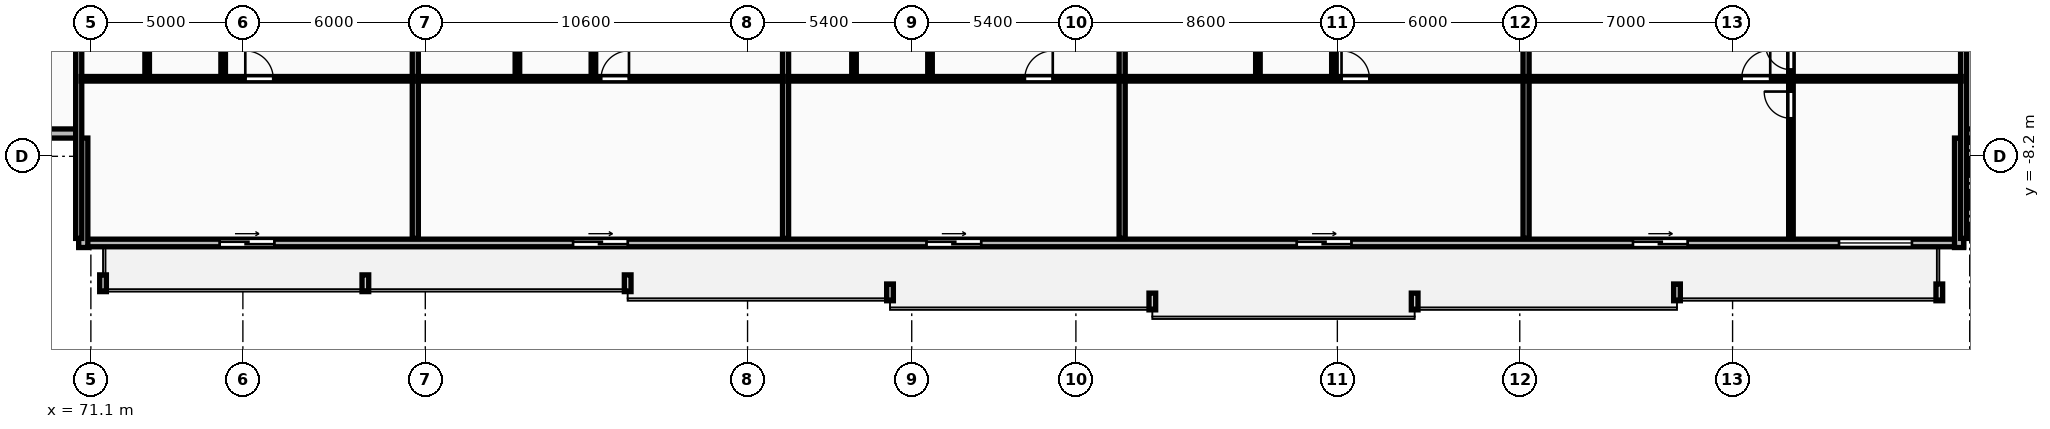
"""IFC4 building model, lengths in metres.
Left out: names, types, materials, properties, quantities, classifications, styles, units other than length and angle.
Written with IfcOpenShell. Run it as: python <this file> out.ifc"""

import sys

from ifc_helpers import new_model, si_unit, direction, frame, frame_2d, origin, place, context, subcontext, project, spatial, rectangle, extrude, element, fill, save


model = new_model("IFC4")
c1 = context("Model", 3, precision=1e-05, world=origin(), true_north=direction((0.0, 1.0)))
c2 = subcontext(c1, "Body", "Model", "MODEL_VIEW")
j1 = project(units=[si_unit("LENGTHUNIT", "METRE"), si_unit("PLANEANGLEUNIT", "RADIAN")], contexts=[c1])
p1 = place(None, origin())
s1 = spatial("IfcSite", under=j1, at=p1, CompositionType="ELEMENT")
p2 = place(p1, origin())
s2 = spatial("IfcBuilding", under=s1, at=p2, CompositionType="ELEMENT")
p3 = place(p2, frame((0.0, 0.0, 24.0)))
s3 = spatial("IfcBuildingStorey", under=s2, at=p3, CompositionType="ELEMENT", Elevation=24.0)
p4 = place(p3, frame((70.7, -11.05, 0.0), z_axis=(0.0, 0.0, 1.0), x_axis=(1.0, 0.0, 0.0)))
e1 = element("IfcWall", 1, at=p4, inside=s3, PredefinedType="STANDARD", context=c2, shape_type="SweptSolid", body=[
    extrude(rectangle(XDim=62.0, YDim=0.25, at=frame_2d((31.0, 0.0))), origin(), (0.0, 0.0, 1.0), 2.97),
])
p5 = place(p4, frame((4.636, 0.0, 0.0)))
e2 = element("IfcOpeningElement", 2, at=p5, cuts=e1, PredefinedType="OPENING", context=c2, shape_type="SweptSolid", body=[
    extrude(rectangle(XDim=1.8, YDim=2.2, at=frame_2d((0.9, 1.1))), frame((0.0, 0.135, 0.0), z_axis=(0.0, -1.0, 0.0), x_axis=(1.0, 0.0, 0.0)), (0.0, 0.0, 1.0), 0.27),
])
p6 = place(p4, frame((16.261, 0.0, 0.0)))
e3 = element("IfcOpeningElement", 3, at=p6, cuts=e1, PredefinedType="OPENING", context=c2, shape_type="SweptSolid", body=[
    extrude(rectangle(XDim=1.8, YDim=2.2, at=frame_2d((0.9, 1.1))), frame((0.0, 0.135, 0.0), z_axis=(0.0, -1.0, 0.0), x_axis=(1.0, 0.0, 0.0)), (0.0, 0.0, 1.0), 0.27),
])
p7 = place(p4, frame((27.886, 0.0, 0.0)))
e4 = element("IfcOpeningElement", 4, at=p7, cuts=e1, PredefinedType="OPENING", context=c2, shape_type="SweptSolid", body=[
    extrude(rectangle(XDim=1.8, YDim=2.2, at=frame_2d((0.9, 1.1))), frame((0.0, 0.135, 0.0), z_axis=(0.0, -1.0, 0.0), x_axis=(1.0, 0.0, 0.0)), (0.0, 0.0, 1.0), 0.27),
])
p8 = place(p4, frame((40.064, 0.0, 0.0)))
e5 = element("IfcOpeningElement", 5, at=p8, cuts=e1, PredefinedType="OPENING", context=c2, shape_type="SweptSolid", body=[
    extrude(rectangle(XDim=1.8, YDim=2.2, at=frame_2d((0.9, 1.1))), frame((0.0, 0.135, 0.0), z_axis=(0.0, -1.0, 0.0), x_axis=(1.0, 0.0, 0.0)), (0.0, 0.0, 1.0), 0.27),
])
p9 = place(p4, frame((51.124, 0.0, 0.0)))
e6 = element("IfcOpeningElement", 6, at=p9, cuts=e1, PredefinedType="OPENING", context=c2, shape_type="SweptSolid", body=[
    extrude(rectangle(XDim=1.8, YDim=2.2, at=frame_2d((0.9, 1.1))), frame((0.0, 0.135, 0.0), z_axis=(0.0, -1.0, 0.0), x_axis=(1.0, 0.0, 0.0)), (0.0, 0.0, 1.0), 0.27),
])
p10 = place(p4, frame((57.9, 0.0, 0.85)))
e7 = element("IfcOpeningElement", 7, at=p10, cuts=e1, PredefinedType="OPENING", context=c2, shape_type="SweptSolid", body=[
    extrude(rectangle(XDim=2.4, YDim=1.9, at=frame_2d((1.2, 0.95))), frame((0.0, 0.135, 0.0), z_axis=(0.0, -1.0, 0.0), x_axis=(1.0, 0.0, 0.0)), (0.0, 0.0, 1.0), 0.27),
])
p11 = place(p3, frame((132.55, -11.2, 0.0), z_axis=(0.0, 0.0, 1.0), x_axis=(0.0, 1.0, 0.0)))
e8 = element("IfcWall", 8, at=p11, inside=s3, PredefinedType="STANDARD", context=c2, shape_type="SweptSolid", body=[
    extrude(rectangle(XDim=3.6, YDim=0.3, at=frame_2d((1.8, 0.0))), origin(), (0.0, 0.0, 1.0), 2.97),
])
p12 = place(p3, frame((132.7, -7.45, 0.0), z_axis=(0.0, 0.0, 1.0), x_axis=(1.0, 0.0, 0.0)))
e9 = element("IfcWall", 9, at=p12, inside=s3, PredefinedType="STANDARD", context=c2, shape_type="SweptSolid", body=[
    extrude(rectangle(XDim=3.6, YDim=0.3, at=frame_2d((1.8, 0.0))), origin(), (0.0, 0.0, 1.0), 2.97),
])
for number, where, z_axis, x_axis in (
    (10, (67.1, -7.45, 0.0), (0.0, 0.0, 1.0), (1.0, 0.0, 0.0)),
    (11, (70.85, -7.6, 0.0), (0.0, 0.0, 1.0), (0.0, -1.0, 0.0)),
):
    element("IfcWall", number, at=place(p3, frame(where, z_axis=z_axis, x_axis=x_axis)), inside=s3, PredefinedType="STANDARD", context=c2, shape_type="SweptSolid", body=[
        extrude(rectangle(XDim=3.6, YDim=0.3, at=frame_2d((1.8, 0.0))), origin(), (0.0, 0.0, 1.0), 2.97),
    ])
for number, where, z_axis, x_axis in (
    (12, (70.7, -10.9, 0.0), (0.0, 0.0, 1.0), (0.0, 1.0, 0.0)),
    (13, (132.7, -10.9, 0.0), (0.0, 0.0, 1.0), (0.0, 1.0, 0.0)),
):
    element("IfcWall", number, at=place(p3, frame(where, z_axis=z_axis, x_axis=x_axis)), inside=s3, PredefinedType="PARTITIONING", context=c2, shape_type="SweptSolid", body=[
        extrude(rectangle(XDim=27.07, YDim=0.2, at=frame_2d((13.535, 0.0))), origin(), (0.0, 0.0, 1.0), 2.97),
    ])
p13 = place(p3, frame((81.771, -10.9, 0.0), z_axis=(0.0, 0.0, 1.0), x_axis=(0.0, 1.0, 0.0)))
e14 = element("IfcWall", 14, at=p13, inside=s3, PredefinedType="PARTITIONING", context=c2, shape_type="SweptSolid", body=[
    extrude(rectangle(XDim=27.07, YDim=0.2, at=frame_2d((13.535, 0.0))), origin(), (0.0, 0.0, 1.0), 2.22),
])
p14 = place(p3, frame((72.951, -5.59, 0.0), z_axis=(0.0, 0.0, 1.0), x_axis=(0.0, 1.0, 0.0)))
e15 = element("IfcWall", 15, at=p14, inside=s3, PredefinedType="PARTITIONING", context=c2, shape_type="SweptSolid", body=[
    extrude(rectangle(XDim=5.0, YDim=0.15, at=frame_2d((2.5, 0.0))), origin(), (0.0, 0.0, 1.0), 2.97),
])
p15 = place(p14, frame((3.049, 0.0, 0.0)))
e16 = element("IfcOpeningElement", 16, at=p15, cuts=e15, PredefinedType="OPENING", context=c2, shape_type="SweptSolid", body=[
    extrude(rectangle(XDim=0.84, YDim=2.04, at=frame_2d((0.42, 1.02))), frame((0.0, 0.085, 0.0), z_axis=(0.0, -1.0, 0.0), x_axis=(1.0, 0.0, 0.0)), (0.0, 0.0, 1.0), 0.17),
])
p16 = place(p3, frame((75.451, -5.59, 0.0), z_axis=(0.0, 0.0, 1.0), x_axis=(0.0, 1.0, 0.0)))
e17 = element("IfcWall", 17, at=p16, inside=s3, PredefinedType="PARTITIONING", context=c2, shape_type="SweptSolid", body=[
    extrude(rectangle(XDim=5.0, YDim=0.15, at=frame_2d((2.5, 0.0))), origin(), (0.0, 0.0, 1.0), 2.97),
])
p17 = place(p16, frame((3.088, 0.0, 0.0)))
e18 = element("IfcOpeningElement", 18, at=p17, cuts=e17, PredefinedType="OPENING", context=c2, shape_type="SweptSolid", body=[
    extrude(rectangle(XDim=0.84, YDim=2.04, at=frame_2d((0.42, 1.02))), frame((0.0, 0.085, 0.0), z_axis=(0.0, -1.0, 0.0), x_axis=(1.0, 0.0, 0.0)), (0.0, 0.0, 1.0), 0.17),
])
p18 = place(p3, frame((70.78, -5.65, 0.0), z_axis=(0.0, 0.0, 1.0), x_axis=(1.0, 0.0, 0.0)))
e19 = element("IfcWall", 19, at=p18, inside=s3, PredefinedType="PARTITIONING", context=c2, shape_type="SweptSolid", body=[
    extrude(rectangle(XDim=10.911, YDim=0.15, at=frame_2d((5.456, 0.0))), origin(), (0.0, 0.0, 1.0), 2.97),
])
p19 = place(p18, frame((5.399, 0.0, 0.0)))
e20 = element("IfcOpeningElement", 20, at=p19, cuts=e19, PredefinedType="OPENING", context=c2, shape_type="SweptSolid", body=[
    extrude(rectangle(XDim=0.92, YDim=2.08, at=frame_2d((0.46, 1.04))), frame((0.0, 0.085, 0.0), z_axis=(0.0, -1.0, 0.0), x_axis=(1.0, 0.0, 0.0)), (0.0, 0.0, 1.0), 0.17),
])
p20 = place(p3, frame((93.95, -10.9, 0.0), z_axis=(0.0, 0.0, 1.0), x_axis=(0.0, 1.0, 0.0)))
e21 = element("IfcWall", 21, at=p20, inside=s3, PredefinedType="PARTITIONING", context=c2, shape_type="SweptSolid", body=[
    extrude(rectangle(XDim=27.07, YDim=0.2, at=frame_2d((13.535, 0.0))), origin(), (0.0, 0.0, 1.0), 2.97),
])
p21 = place(p3, frame((85.13, -5.59, 0.0), z_axis=(0.0, 0.0, 1.0), x_axis=(0.0, 1.0, 0.0)))
e22 = element("IfcWall", 22, at=p21, inside=s3, PredefinedType="PARTITIONING", context=c2, shape_type="SweptSolid", body=[
    extrude(rectangle(XDim=5.0, YDim=0.15, at=frame_2d((2.5, 0.0))), origin(), (0.0, 0.0, 1.0), 2.97),
])
p22 = place(p21, frame((2.08, 0.0, 0.0)))
e23 = element("IfcOpeningElement", 23, at=p22, cuts=e22, PredefinedType="OPENING", context=c2, shape_type="SweptSolid", body=[
    extrude(rectangle(XDim=0.84, YDim=2.04, at=frame_2d((0.42, 1.02))), frame((0.0, 0.085, 0.0), z_axis=(0.0, -1.0, 0.0), x_axis=(1.0, 0.0, 0.0)), (0.0, 0.0, 1.0), 0.17),
])
p23 = place(p3, frame((87.63, -5.59, 0.0), z_axis=(0.0, 0.0, 1.0), x_axis=(0.0, 1.0, 0.0)))
e24 = element("IfcWall", 24, at=p23, inside=s3, PredefinedType="PARTITIONING", context=c2, shape_type="SweptSolid", body=[
    extrude(rectangle(XDim=5.0, YDim=0.15, at=frame_2d((2.5, 0.0))), origin(), (0.0, 0.0, 1.0), 2.97),
])
p24 = place(p23, frame((2.08, 0.0, 0.0)))
e25 = element("IfcOpeningElement", 25, at=p24, cuts=e24, PredefinedType="OPENING", context=c2, shape_type="SweptSolid", body=[
    extrude(rectangle(XDim=0.84, YDim=2.04, at=frame_2d((0.42, 1.02))), frame((0.0, 0.085, 0.0), z_axis=(0.0, -1.0, 0.0), x_axis=(1.0, 0.0, 0.0)), (0.0, 0.0, 1.0), 0.17),
])
p25 = place(p3, frame((81.851, -5.65, 0.0), z_axis=(0.0, 0.0, 1.0), x_axis=(1.0, 0.0, 0.0)))
e26 = element("IfcWall", 26, at=p25, inside=s3, PredefinedType="PARTITIONING", context=c2, shape_type="SweptSolid", body=[
    extrude(rectangle(XDim=12.019, YDim=0.15, at=frame_2d((6.009, 0.0))), origin(), (0.0, 0.0, 1.0), 2.97),
])
p26 = place(p25, frame((6.029, 0.0, 0.0)))
e27 = element("IfcOpeningElement", 27, at=p26, cuts=e26, PredefinedType="OPENING", context=c2, shape_type="SweptSolid", body=[
    extrude(rectangle(XDim=0.92, YDim=2.08, at=frame_2d((0.46, 1.04))), frame((0.0, 0.085, 0.0), z_axis=(0.0, -1.0, 0.0), x_axis=(1.0, 0.0, 0.0)), (0.0, 0.0, 1.0), 0.17),
])
p27 = place(p3, frame((105.021, -10.9, 0.0), z_axis=(0.0, 0.0, 1.0), x_axis=(0.0, 1.0, 0.0)))
e28 = element("IfcWall", 28, at=p27, inside=s3, PredefinedType="PARTITIONING", context=c2, shape_type="SweptSolid", body=[
    extrude(rectangle(XDim=27.07, YDim=0.2, at=frame_2d((13.535, 0.0))), origin(), (0.0, 0.0, 1.0), 2.97),
])
p28 = place(p3, frame((96.201, -5.59, 0.0), z_axis=(0.0, 0.0, 1.0), x_axis=(0.0, 1.0, 0.0)))
e29 = element("IfcWall", 29, at=p28, inside=s3, PredefinedType="PARTITIONING", context=c2, shape_type="SweptSolid", body=[
    extrude(rectangle(XDim=5.0, YDim=0.15, at=frame_2d((2.5, 0.0))), origin(), (0.0, 0.0, 1.0), 2.97),
])
p29 = place(p28, frame((2.08, 0.0, 0.0)))
e30 = element("IfcOpeningElement", 30, at=p29, cuts=e29, PredefinedType="OPENING", context=c2, shape_type="SweptSolid", body=[
    extrude(rectangle(XDim=0.84, YDim=2.04, at=frame_2d((0.42, 1.02))), frame((0.0, 0.085, 0.0), z_axis=(0.0, -1.0, 0.0), x_axis=(1.0, 0.0, 0.0)), (0.0, 0.0, 1.0), 0.17),
])
p30 = place(p3, frame((98.701, -5.59, 0.0), z_axis=(0.0, 0.0, 1.0), x_axis=(0.0, 1.0, 0.0)))
e31 = element("IfcWall", 31, at=p30, inside=s3, PredefinedType="PARTITIONING", context=c2, shape_type="SweptSolid", body=[
    extrude(rectangle(XDim=5.0, YDim=0.15, at=frame_2d((2.5, 0.0))), origin(), (0.0, 0.0, 1.0), 2.97),
])
p31 = place(p30, frame((3.088, 0.0, 0.0)))
e32 = element("IfcOpeningElement", 32, at=p31, cuts=e31, PredefinedType="OPENING", context=c2, shape_type="SweptSolid", body=[
    extrude(rectangle(XDim=0.84, YDim=2.04, at=frame_2d((0.42, 1.02))), frame((0.0, 0.085, 0.0), z_axis=(0.0, -1.0, 0.0), x_axis=(1.0, 0.0, 0.0)), (0.0, 0.0, 1.0), 0.17),
])
p32 = place(p3, frame((94.03, -5.65, 0.0), z_axis=(0.0, 0.0, 1.0), x_axis=(1.0, 0.0, 0.0)))
e33 = element("IfcWall", 33, at=p32, inside=s3, PredefinedType="PARTITIONING", context=c2, shape_type="SweptSolid", body=[
    extrude(rectangle(XDim=10.911, YDim=0.15, at=frame_2d((5.456, 0.0))), origin(), (0.0, 0.0, 1.0), 2.97),
])
p33 = place(p32, frame((7.789, 0.0, 0.0)))
e34 = element("IfcOpeningElement", 34, at=p33, cuts=e33, PredefinedType="OPENING", context=c2, shape_type="SweptSolid", body=[
    extrude(rectangle(XDim=0.92, YDim=2.08, at=frame_2d((0.46, 1.04))), frame((0.0, 0.085, 0.0), z_axis=(0.0, -1.0, 0.0), x_axis=(1.0, 0.0, 0.0)), (0.0, 0.0, 1.0), 0.17),
])
p34 = place(p3, frame((118.307, -10.9, 0.0), z_axis=(0.0, 0.0, 1.0), x_axis=(0.0, 1.0, 0.0)))
e35 = element("IfcWall", 35, at=p34, inside=s3, PredefinedType="PARTITIONING", context=c2, shape_type="SweptSolid", body=[
    extrude(rectangle(XDim=27.07, YDim=0.2, at=frame_2d((13.535, 0.0))), origin(), (0.0, 0.0, 1.0), 2.22),
])
p35 = place(p3, frame((109.487, -5.59, 0.0), z_axis=(0.0, 0.0, 1.0), x_axis=(0.0, 1.0, 0.0)))
e36 = element("IfcWall", 36, at=p35, inside=s3, PredefinedType="PARTITIONING", context=c2, shape_type="SweptSolid", body=[
    extrude(rectangle(XDim=5.0, YDim=0.15, at=frame_2d((2.5, 0.0))), origin(), (0.0, 0.0, 1.0), 2.22),
])
p36 = place(p35, frame((3.049, 0.0, 0.0)))
e37 = element("IfcOpeningElement", 37, at=p36, cuts=e36, PredefinedType="OPENING", context=c2, shape_type="SweptSolid", body=[
    extrude(rectangle(XDim=0.84, YDim=2.04, at=frame_2d((0.42, 1.02))), frame((0.0, 0.085, 0.0), z_axis=(0.0, -1.0, 0.0), x_axis=(1.0, 0.0, 0.0)), (0.0, 0.0, 1.0), 0.17),
])
p37 = place(p3, frame((111.987, -5.59, 0.0), z_axis=(0.0, 0.0, 1.0), x_axis=(0.0, 1.0, 0.0)))
e38 = element("IfcWall", 38, at=p37, inside=s3, PredefinedType="PARTITIONING", context=c2, shape_type="SweptSolid", body=[
    extrude(rectangle(XDim=5.0, YDim=0.15, at=frame_2d((2.5, 0.0))), origin(), (0.0, 0.0, 1.0), 2.97),
])
p38 = place(p37, frame((2.08, 0.0, 0.0)))
e39 = element("IfcOpeningElement", 39, at=p38, cuts=e38, PredefinedType="OPENING", context=c2, shape_type="SweptSolid", body=[
    extrude(rectangle(XDim=0.84, YDim=2.04, at=frame_2d((0.42, 1.02))), frame((0.0, 0.085, 0.0), z_axis=(0.0, -1.0, 0.0), x_axis=(1.0, 0.0, 0.0)), (0.0, 0.0, 1.0), 0.17),
])
p39 = place(p3, frame((105.101, -5.65, 0.0), z_axis=(0.0, 0.0, 1.0), x_axis=(1.0, 0.0, 0.0)))
e40 = element("IfcWall", 40, at=p39, inside=s3, PredefinedType="PARTITIONING", context=c2, shape_type="SweptSolid", body=[
    extrude(rectangle(XDim=13.126, YDim=0.15, at=frame_2d((6.563, 0.0))), origin(), (0.0, 0.0, 1.0), 2.97),
])
p40 = place(p39, frame((7.136, 0.0, 0.0)))
e41 = element("IfcOpeningElement", 41, at=p40, cuts=e40, PredefinedType="OPENING", context=c2, shape_type="SweptSolid", body=[
    extrude(rectangle(XDim=0.92, YDim=2.08, at=frame_2d((0.46, 1.04))), frame((0.0, 0.085, 0.0), z_axis=(0.0, -1.0, 0.0), x_axis=(1.0, 0.0, 0.0)), (0.0, 0.0, 1.0), 0.17),
])
p41 = place(p3, frame((127.02, -10.9, 0.0), z_axis=(0.0, 0.0, 1.0), x_axis=(0.0, 1.0, 0.0)))
e42 = element("IfcWall", 42, at=p41, inside=s3, PredefinedType="PARTITIONING", context=c2, shape_type="SweptSolid", body=[
    extrude(rectangle(XDim=10.31, YDim=0.15, at=frame_2d((5.155, 0.0))), origin(), (0.0, 0.0, 1.0), 2.97),
])
p42 = place(p41, frame((5.55, 0.0, 0.0)))
e43 = element("IfcOpeningElement", 43, at=p42, cuts=e42, PredefinedType="OPENING", context=c2, shape_type="SweptSolid", body=[
    extrude(rectangle(XDim=0.84, YDim=2.04, at=frame_2d((0.42, 1.02))), frame((0.0, 0.085, 0.0), z_axis=(0.0, -1.0, 0.0), x_axis=(1.0, 0.0, 0.0)), (0.0, 0.0, 1.0), 0.17),
])
p43 = place(p41, frame((8.362, 0.0, 0.0)))
e44 = element("IfcOpeningElement", 44, at=p43, cuts=e42, PredefinedType="OPENING", context=c2, shape_type="SweptSolid", body=[
    extrude(rectangle(XDim=0.84, YDim=2.04, at=frame_2d((0.42, 1.02))), frame((0.0, 0.085, 0.0), z_axis=(0.0, -1.0, 0.0), x_axis=(1.0, 0.0, 0.0)), (0.0, 0.0, 1.0), 0.17),
])
p44 = place(p41, frame((3.95, 0.0, 0.0)))
e45 = element("IfcOpeningElement", 45, at=p44, cuts=e42, PredefinedType="OPENING", context=c2, shape_type="SweptSolid", body=[
    extrude(rectangle(XDim=0.88, YDim=2.06, at=frame_2d((0.44, 1.03))), frame((0.0, 0.085, 0.0), z_axis=(0.0, -1.0, 0.0), x_axis=(1.0, 0.0, 0.0)), (0.0, 0.0, 1.0), 0.17),
])
p45 = place(p3, frame((118.387, -5.65, 0.0), z_axis=(0.0, 0.0, 1.0), x_axis=(1.0, 0.0, 0.0)))
e46 = element("IfcWall", 46, at=p45, inside=s3, PredefinedType="PARTITIONING", context=c2, shape_type="SweptSolid", body=[
    extrude(rectangle(XDim=14.233, YDim=0.15, at=frame_2d((7.116, 0.0))), origin(), (0.0, 0.0, 1.0), 2.97),
])
p46 = place(p45, frame((7.011, 0.0, 0.0)))
e47 = element("IfcOpeningElement", 47, at=p46, cuts=e46, PredefinedType="OPENING", context=c2, shape_type="SweptSolid", body=[
    extrude(rectangle(XDim=0.94, YDim=2.1, at=frame_2d((0.47, 1.05))), frame((0.0, 0.085, 0.0), z_axis=(0.0, -1.0, 0.0), x_axis=(1.0, 0.0, 0.0)), (0.0, 0.0, 1.0), 0.17),
])
p47 = place(p5, origin())
e48 = element("IfcDoor", 48, at=p47, inside=s3, OperationType="SLIDING_TO_RIGHT", PredefinedType="DOOR", context=c2, shape_type="SweptSolid", body=[
    extrude(rectangle(XDim=1.8, YDim=2.2, at=frame_2d((0.9, 1.1))), frame((0.0, 0.025, 0.0), z_axis=(0.0, -1.0, 0.0), x_axis=(1.0, 0.0, 0.0)), (0.0, 0.0, 1.0), 0.05),
])
fill(e2, e48)
p48 = place(p6, origin())
e49 = element("IfcDoor", 49, at=p48, inside=s3, OperationType="SLIDING_TO_RIGHT", PredefinedType="DOOR", context=c2, shape_type="SweptSolid", body=[
    extrude(rectangle(XDim=1.8, YDim=2.2, at=frame_2d((0.9, 1.1))), frame((0.0, 0.025, 0.0), z_axis=(0.0, -1.0, 0.0), x_axis=(1.0, 0.0, 0.0)), (0.0, 0.0, 1.0), 0.05),
])
fill(e3, e49)
p49 = place(p7, origin())
e50 = element("IfcDoor", 50, at=p49, inside=s3, OperationType="SLIDING_TO_RIGHT", PredefinedType="DOOR", context=c2, shape_type="SweptSolid", body=[
    extrude(rectangle(XDim=1.8, YDim=2.2, at=frame_2d((0.9, 1.1))), frame((0.0, 0.025, 0.0), z_axis=(0.0, -1.0, 0.0), x_axis=(1.0, 0.0, 0.0)), (0.0, 0.0, 1.0), 0.05),
])
fill(e4, e50)
p50 = place(p8, origin())
e51 = element("IfcDoor", 51, at=p50, inside=s3, OperationType="SLIDING_TO_RIGHT", PredefinedType="DOOR", context=c2, shape_type="SweptSolid", body=[
    extrude(rectangle(XDim=1.8, YDim=2.2, at=frame_2d((0.9, 1.1))), frame((0.0, 0.025, 0.0), z_axis=(0.0, -1.0, 0.0), x_axis=(1.0, 0.0, 0.0)), (0.0, 0.0, 1.0), 0.05),
])
fill(e5, e51)
p51 = place(p9, origin())
e52 = element("IfcDoor", 52, at=p51, inside=s3, OperationType="SLIDING_TO_RIGHT", PredefinedType="DOOR", context=c2, shape_type="SweptSolid", body=[
    extrude(rectangle(XDim=1.8, YDim=2.2, at=frame_2d((0.9, 1.1))), frame((0.0, 0.025, 0.0), z_axis=(0.0, -1.0, 0.0), x_axis=(1.0, 0.0, 0.0)), (0.0, 0.0, 1.0), 0.05),
])
fill(e6, e52)
p52 = place(p10, origin())
e53 = element("IfcWindow", 53, at=p52, inside=s3, PartitioningType="DOUBLE_PANEL_VERTICAL", PredefinedType="WINDOW", context=c2, shape_type="SweptSolid", body=[
    extrude(rectangle(XDim=2.4, YDim=1.9, at=frame_2d((1.2, 0.95))), frame((0.0, 0.03, 0.0), z_axis=(0.0, -1.0, 0.0), x_axis=(1.0, 0.0, 0.0)), (0.0, 0.0, 1.0), 0.06),
])
fill(e7, e53)
p53 = place(p19, origin())
e54 = element("IfcDoor", 54, at=p53, inside=s3, OperationType="SINGLE_SWING_LEFT", PredefinedType="DOOR", context=c2, shape_type="SweptSolid", body=[
    extrude(rectangle(XDim=0.92, YDim=2.08, at=frame_2d((0.46, 1.04))), frame((0.0, 0.025, 0.0), z_axis=(0.0, -1.0, 0.0), x_axis=(1.0, 0.0, 0.0)), (0.0, 0.0, 1.0), 0.05),
])
fill(e20, e54)
p54 = place(p26, origin())
e55 = element("IfcDoor", 55, at=p54, inside=s3, OperationType="SINGLE_SWING_RIGHT", PredefinedType="DOOR", context=c2, shape_type="SweptSolid", body=[
    extrude(rectangle(XDim=0.92, YDim=2.08, at=frame_2d((0.46, 1.04))), frame((0.0, 0.025, 0.0), z_axis=(0.0, -1.0, 0.0), x_axis=(1.0, 0.0, 0.0)), (0.0, 0.0, 1.0), 0.05),
])
fill(e27, e55)
p55 = place(p33, origin())
e56 = element("IfcDoor", 56, at=p55, inside=s3, OperationType="SINGLE_SWING_RIGHT", PredefinedType="DOOR", context=c2, shape_type="SweptSolid", body=[
    extrude(rectangle(XDim=0.92, YDim=2.08, at=frame_2d((0.46, 1.04))), frame((0.0, 0.025, 0.0), z_axis=(0.0, -1.0, 0.0), x_axis=(1.0, 0.0, 0.0)), (0.0, 0.0, 1.0), 0.05),
])
fill(e34, e56)
p56 = place(p40, origin())
e57 = element("IfcDoor", 57, at=p56, inside=s3, OperationType="SINGLE_SWING_LEFT", PredefinedType="DOOR", context=c2, shape_type="SweptSolid", body=[
    extrude(rectangle(XDim=0.92, YDim=2.08, at=frame_2d((0.46, 1.04))), frame((0.0, 0.025, 0.0), z_axis=(0.0, -1.0, 0.0), x_axis=(1.0, 0.0, 0.0)), (0.0, 0.0, 1.0), 0.05),
])
fill(e41, e57)
p57 = place(p42, origin())
e58 = element("IfcDoor", 58, at=p57, inside=s3, OperationType="SINGLE_SWING_RIGHT", PredefinedType="DOOR", context=c2, shape_type="SweptSolid", body=[
    extrude(rectangle(XDim=0.84, YDim=2.04, at=frame_2d((0.42, 1.02))), frame((0.0, 0.025, 0.0), z_axis=(0.0, -1.0, 0.0), x_axis=(1.0, 0.0, 0.0)), (0.0, 0.0, 1.0), 0.05),
])
fill(e43, e58)
p58 = place(p44, origin())
e59 = element("IfcDoor", 59, at=p58, inside=s3, OperationType="SINGLE_SWING_RIGHT", PredefinedType="DOOR", context=c2, shape_type="SweptSolid", body=[
    extrude(rectangle(XDim=0.88, YDim=2.06, at=frame_2d((0.44, 1.03))), frame((0.0, 0.025, 0.0), z_axis=(0.0, -1.0, 0.0), x_axis=(1.0, 0.0, 0.0)), (0.0, 0.0, 1.0), 0.05),
])
fill(e45, e59)
p59 = place(p46, origin())
e60 = element("IfcDoor", 60, at=p59, inside=s3, OperationType="SINGLE_SWING_RIGHT", PredefinedType="DOOR", context=c2, shape_type="SweptSolid", body=[
    extrude(rectangle(XDim=0.94, YDim=2.1, at=frame_2d((0.47, 1.05))), frame((0.0, 0.025, 0.0), z_axis=(0.0, -1.0, 0.0), x_axis=(1.0, 0.0, 0.0)), (0.0, 0.0, 1.0), 0.05),
])
fill(e47, e60)
save(model, sys.argv[1])
